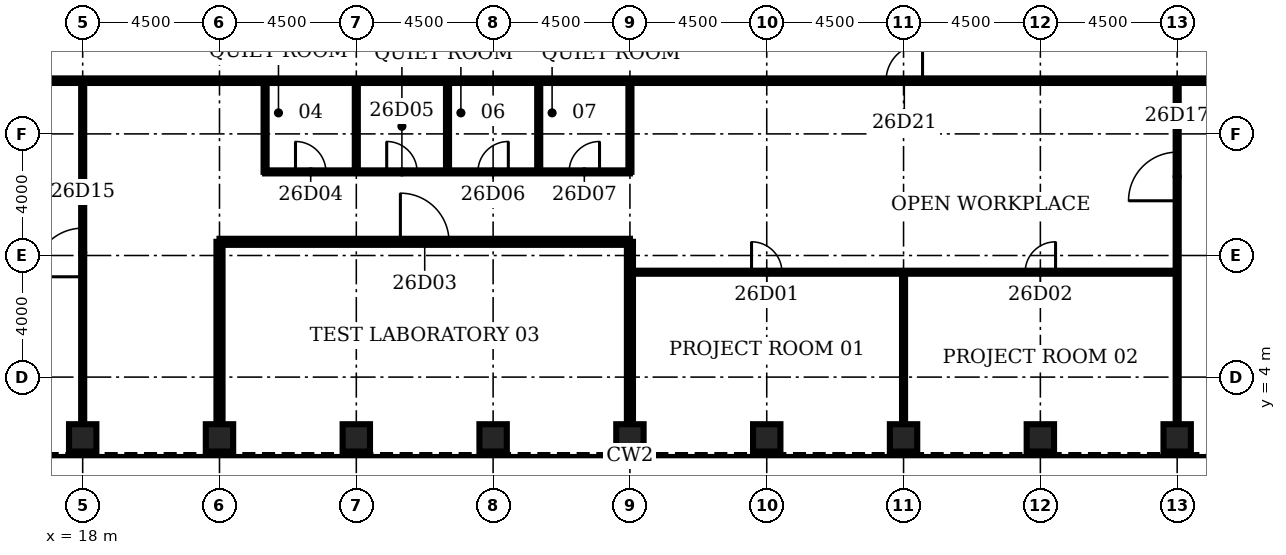
"""IFC4 building model, lengths in metres.
Left out: names, types, materials, properties, quantities, classifications, styles, units other than length and angle.
Written with IfcOpenShell. Run it as: python <this file> out.ifc"""

import sys

from ifc_helpers import new_model, si_unit, direction, frame, frame_2d, origin, origin_2d, place, context, subcontext, project, spatial, rectangle, hollow_rectangle, extrude, element, fill, save


model = new_model("IFC4")
c1 = context("Model", 3, precision=1e-05, world=origin(), true_north=direction((0.0, 1.0)))
c2 = subcontext(c1, "Body", "Model", "MODEL_VIEW")
j1 = project(units=[si_unit("LENGTHUNIT", "METRE"), si_unit("PLANEANGLEUNIT", "RADIAN")], contexts=[c1])
p1 = place(None, origin())
s1 = spatial("IfcSite", under=j1, at=p1, CompositionType="ELEMENT")
p2 = place(p1, origin())
s2 = spatial("IfcBuilding", under=s1, at=p2, CompositionType="ELEMENT")
p3 = place(p2, frame((0.0, 0.0, 121.5)))
s3 = spatial("IfcBuildingStorey", under=s2, at=p3, CompositionType="ELEMENT", Elevation=121.5)
for number, where, z_axis, x_axis in (
    (1, (18.0, 2.0, 0.0), (0.0, 0.0, 1.0), (0.0, 1.0, 0.0)),
    (2, (22.5, 2.0, 0.0), (0.0, 0.0, 1.0), (0.0, 1.0, 0.0)),
    (3, (27.0, 2.0, 0.0), (0.0, 0.0, 1.0), (0.0, 1.0, 0.0)),
    (4, (31.5, 2.0, 0.0), (0.0, 0.0, 1.0), (0.0, 1.0, 0.0)),
    (5, (36.0, 2.0, 0.0), (0.0, 0.0, 1.0), (0.0, 1.0, 0.0)),
    (6, (40.5, 2.0, 0.0), (0.0, 0.0, 1.0), (0.0, 1.0, 0.0)),
    (7, (45.0, 2.0, 0.0), (0.0, 0.0, 1.0), (0.0, 1.0, 0.0)),
    (8, (49.5, 2.0, 0.0), (0.0, 0.0, 1.0), (0.0, 1.0, 0.0)),
    (9, (54.0, 2.0, 0.0), (0.0, 0.0, 1.0), (0.0, 1.0, 0.0)),
):
    element("IfcColumn", number, at=place(p3, frame(where, z_axis=z_axis, x_axis=x_axis)), inside=s3, PredefinedType="COLUMN", context=c2, shape_type="SweptSolid", body=[
        extrude(hollow_rectangle(XDim=0.9, YDim=0.9, WallThickness=0.1, at=origin_2d()), origin(), (0.0, 0.0, 1.0), 4.2),
    ])
p4 = place(p3, frame((36.0, 7.45, 0.0), z_axis=(0.0, 0.0, 1.0), x_axis=(1.0, 0.0, 0.0)))
e10 = element("IfcWall", 10, at=p4, inside=s3, PredefinedType="PARTITIONING", context=c2, shape_type="SweptSolid", body=[
    extrude(rectangle(XDim=18.0, YDim=0.1, at=frame_2d((9.0, 0.0))), origin(), (0.0, 0.0, 1.0), 3.0),
])
p5 = place(p4, frame((4.0, 0.0, 0.0)))
e11 = element("IfcOpeningElement", 11, at=p5, cuts=e10, PredefinedType="OPENING", context=c2, shape_type="SweptSolid", body=[
    extrude(rectangle(XDim=1.0, YDim=2.1, at=frame_2d((0.5, 1.05))), frame((0.0, 0.06, 0.0), z_axis=(0.0, -1.0, 0.0), x_axis=(1.0, 0.0, 0.0)), (0.0, 0.0, 1.0), 0.12),
])
p6 = place(p4, frame((13.0, 0.0, 0.0)))
e12 = element("IfcOpeningElement", 12, at=p6, cuts=e10, PredefinedType="OPENING", context=c2, shape_type="SweptSolid", body=[
    extrude(rectangle(XDim=1.0, YDim=2.1, at=frame_2d((0.5, 1.05))), frame((0.0, 0.06, 0.0), z_axis=(0.0, -1.0, 0.0), x_axis=(1.0, 0.0, 0.0)), (0.0, 0.0, 1.0), 0.12),
])
p7 = place(p3, frame((22.5, 8.45, 0.0), z_axis=(0.0, 0.0, 1.0), x_axis=(1.0, 0.0, 0.0)))
e13 = element("IfcWall", 13, at=p7, inside=s3, PredefinedType="PARTITIONING", context=c2, shape_type="SweptSolid", body=[
    extrude(rectangle(XDim=13.5, YDim=0.2, at=frame_2d((6.75, 0.0))), origin(), (0.0, 0.0, 1.0), 3.0),
])
p8 = place(p7, frame((5.95, 0.0, 0.0)))
e14 = element("IfcOpeningElement", 14, at=p8, cuts=e13, PredefinedType="OPENING", context=c2, shape_type="SweptSolid", body=[
    extrude(rectangle(XDim=1.6, YDim=2.1, at=frame_2d((0.8, 1.05))), frame((0.0, 0.11, 0.0), z_axis=(0.0, -1.0, 0.0), x_axis=(1.0, 0.0, 0.0)), (0.0, 0.0, 1.0), 0.22),
])
p9 = place(p3, frame((24.0, 10.75, 0.0), z_axis=(0.0, 0.0, 1.0), x_axis=(1.0, 0.0, 0.0)))
e15 = element("IfcWall", 15, at=p9, inside=s3, PredefinedType="PARTITIONING", context=c2, shape_type="SweptSolid", body=[
    extrude(rectangle(XDim=12.0, YDim=0.1, at=frame_2d((6.0, 0.0))), origin(), (0.0, 0.0, 1.0), 3.0),
])
p10 = place(p9, frame((1.0, 0.0, 0.0)))
e16 = element("IfcOpeningElement", 16, at=p10, cuts=e15, PredefinedType="OPENING", context=c2, shape_type="SweptSolid", body=[
    extrude(rectangle(XDim=1.0, YDim=2.1, at=frame_2d((0.5, 1.05))), frame((0.0, 0.06, 0.0), z_axis=(0.0, -1.0, 0.0), x_axis=(1.0, 0.0, 0.0)), (0.0, 0.0, 1.0), 0.12),
])
p11 = place(p9, frame((4.0, 0.0, 0.0)))
e17 = element("IfcOpeningElement", 17, at=p11, cuts=e15, PredefinedType="OPENING", context=c2, shape_type="SweptSolid", body=[
    extrude(rectangle(XDim=1.0, YDim=2.1, at=frame_2d((0.5, 1.05))), frame((0.0, 0.06, 0.0), z_axis=(0.0, -1.0, 0.0), x_axis=(1.0, 0.0, 0.0)), (0.0, 0.0, 1.0), 0.12),
])
p12 = place(p9, frame((7.0, 0.0, 0.0)))
e18 = element("IfcOpeningElement", 18, at=p12, cuts=e15, PredefinedType="OPENING", context=c2, shape_type="SweptSolid", body=[
    extrude(rectangle(XDim=1.0, YDim=2.1, at=frame_2d((0.5, 1.05))), frame((0.0, 0.06, 0.0), z_axis=(0.0, -1.0, 0.0), x_axis=(1.0, 0.0, 0.0)), (0.0, 0.0, 1.0), 0.12),
])
p13 = place(p9, frame((10.0, 0.0, 0.0)))
e19 = element("IfcOpeningElement", 19, at=p13, cuts=e15, PredefinedType="OPENING", context=c2, shape_type="SweptSolid", body=[
    extrude(rectangle(XDim=1.0, YDim=2.1, at=frame_2d((0.5, 1.05))), frame((0.0, 0.06, 0.0), z_axis=(0.0, -1.0, 0.0), x_axis=(1.0, 0.0, 0.0)), (0.0, 0.0, 1.0), 0.12),
])
p14 = place(p3, frame((15.15, 13.75, 0.0), z_axis=(0.0, 0.0, 1.0), x_axis=(1.0, 0.0, 0.0)))
e20 = element("IfcWall", 20, at=p14, inside=s3, PredefinedType="PARTITIONING", context=c2, shape_type="SweptSolid", body=[
    extrude(rectangle(XDim=41.7, YDim=0.15, at=frame_2d((20.85, 0.0))), origin(), (0.0, 0.0, 1.0), 3.0),
])
p15 = place(p14, frame((29.275, 0.0, 0.0)))
e21 = element("IfcOpeningElement", 21, at=p15, cuts=e20, PredefinedType="OPENING", context=c2, shape_type="SweptSolid", body=[
    extrude(rectangle(XDim=1.2, YDim=2.1, at=frame_2d((0.6, 1.05))), frame((0.0, 0.085, 0.0), z_axis=(0.0, -1.0, 0.0), x_axis=(1.0, 0.0, 0.0)), (0.0, 0.0, 1.0), 0.17),
])
p16 = place(p3, frame((18.0, 2.45, 0.0), z_axis=(0.0, 0.0, 1.0), x_axis=(0.0, 1.0, 0.0)))
e22 = element("IfcWall", 22, at=p16, inside=s3, PredefinedType="PARTITIONING", context=c2, shape_type="SweptSolid", body=[
    extrude(rectangle(XDim=11.3, YDim=0.1, at=frame_2d((5.65, 0.0))), origin(), (0.0, 0.0, 1.0), 3.0),
])
p17 = place(p16, frame((4.85, 0.0, 0.0)))
e23 = element("IfcOpeningElement", 23, at=p17, cuts=e22, PredefinedType="OPENING", context=c2, shape_type="SweptSolid", body=[
    extrude(rectangle(XDim=1.6, YDim=2.1, at=frame_2d((0.8, 1.05))), frame((0.0, 0.06, 0.0), z_axis=(0.0, -1.0, 0.0), x_axis=(1.0, 0.0, 0.0)), (0.0, 0.0, 1.0), 0.12),
])
p18 = place(p3, frame((22.5, 2.45, 0.0), z_axis=(0.0, 0.0, 1.0), x_axis=(0.0, 1.0, 0.0)))
e24 = element("IfcWall", 24, at=p18, inside=s3, PredefinedType="PARTITIONING", context=c2, shape_type="SweptSolid", body=[
    extrude(rectangle(XDim=6.0, YDim=0.2, at=frame_2d((3.0, 0.0))), origin(), (0.0, 0.0, 1.0), 3.0),
])
for number, where, z_axis, x_axis in (
    (25, (24.0, 10.75, 0.0), (0.0, 0.0, 1.0), (0.0, 1.0, 0.0)),
    (26, (27.0, 10.75, 0.0), (0.0, 0.0, 1.0), (0.0, 1.0, 0.0)),
    (27, (30.0, 10.75, 0.0), (0.0, 0.0, 1.0), (0.0, 1.0, 0.0)),
    (28, (33.0, 10.75, 0.0), (0.0, 0.0, 1.0), (0.0, 1.0, 0.0)),
):
    element("IfcWall", number, at=place(p3, frame(where, z_axis=z_axis, x_axis=x_axis)), inside=s3, PredefinedType="PARTITIONING", context=c2, shape_type="SweptSolid", body=[
        extrude(rectangle(XDim=3.0, YDim=0.1, at=frame_2d((1.5, 0.0))), origin(), (0.0, 0.0, 1.0), 3.0),
    ])
p19 = place(p3, frame((36.0, 2.45, 0.0), z_axis=(0.0, 0.0, 1.0), x_axis=(0.0, 1.0, 0.0)))
e29 = element("IfcWall", 29, at=p19, inside=s3, PredefinedType="PARTITIONING", context=c2, shape_type="SweptSolid", body=[
    extrude(rectangle(XDim=6.0, YDim=0.2, at=frame_2d((3.0, 0.0))), origin(), (0.0, 0.0, 1.0), 3.0),
])
p20 = place(p3, frame((36.0, 10.75, 0.0), z_axis=(0.0, 0.0, 1.0), x_axis=(0.0, 1.0, 0.0)))
e30 = element("IfcWall", 30, at=p20, inside=s3, PredefinedType="PARTITIONING", context=c2, shape_type="SweptSolid", body=[
    extrude(rectangle(XDim=3.0, YDim=0.1, at=frame_2d((1.5, 0.0))), origin(), (0.0, 0.0, 1.0), 3.0),
])
p21 = place(p3, frame((45.0, 2.45, 0.0), z_axis=(0.0, 0.0, 1.0), x_axis=(0.0, 1.0, 0.0)))
e31 = element("IfcWall", 31, at=p21, inside=s3, PredefinedType="PARTITIONING", context=c2, shape_type="SweptSolid", body=[
    extrude(rectangle(XDim=5.0, YDim=0.1, at=frame_2d((2.5, 0.0))), origin(), (0.0, 0.0, 1.0), 3.0),
])
p22 = place(p3, frame((54.0, 2.45, 0.0), z_axis=(0.0, 0.0, 1.0), x_axis=(0.0, 1.0, 0.0)))
e32 = element("IfcWall", 32, at=p22, inside=s3, PredefinedType="PARTITIONING", context=c2, shape_type="SweptSolid", body=[
    extrude(rectangle(XDim=11.3, YDim=0.1, at=frame_2d((5.65, 0.0))), origin(), (0.0, 0.0, 1.0), 3.0),
])
p23 = place(p22, frame((7.35, 0.0, 0.0)))
e33 = element("IfcOpeningElement", 33, at=p23, cuts=e32, PredefinedType="OPENING", context=c2, shape_type="SweptSolid", body=[
    extrude(rectangle(XDim=1.6, YDim=2.1, at=frame_2d((0.8, 1.05))), frame((0.0, 0.06, 0.0), z_axis=(0.0, -1.0, 0.0), x_axis=(1.0, 0.0, 0.0)), (0.0, 0.0, 1.0), 0.12),
])
p24 = place(p5, origin())
e34 = element("IfcDoor", 34, at=p24, inside=s3, OperationType="SINGLE_SWING_LEFT", PredefinedType="DOOR", context=c2, shape_type="SweptSolid", body=[
    extrude(rectangle(XDim=1.0, YDim=2.1, at=frame_2d((0.5, 1.05))), frame((0.0, 0.025, 0.0), z_axis=(0.0, -1.0, 0.0), x_axis=(1.0, 0.0, 0.0)), (0.0, 0.0, 1.0), 0.05),
])
fill(e11, e34)
p25 = place(p6, origin())
e35 = element("IfcDoor", 35, at=p25, inside=s3, OperationType="SINGLE_SWING_RIGHT", PredefinedType="DOOR", context=c2, shape_type="SweptSolid", body=[
    extrude(rectangle(XDim=1.0, YDim=2.1, at=frame_2d((0.5, 1.05))), frame((0.0, 0.025, 0.0), z_axis=(0.0, -1.0, 0.0), x_axis=(1.0, 0.0, 0.0)), (0.0, 0.0, 1.0), 0.05),
])
fill(e12, e35)
p26 = place(p8, origin())
e36 = element("IfcDoor", 36, at=p26, inside=s3, OperationType="SINGLE_SWING_LEFT", PredefinedType="DOOR", context=c2, shape_type="SweptSolid", body=[
    extrude(rectangle(XDim=1.6, YDim=2.1, at=frame_2d((0.8, 1.05))), frame((0.0, 0.025, 0.0), z_axis=(0.0, -1.0, 0.0), x_axis=(1.0, 0.0, 0.0)), (0.0, 0.0, 1.0), 0.05),
])
fill(e14, e36)
p27 = place(p10, origin())
e37 = element("IfcDoor", 37, at=p27, inside=s3, OperationType="SINGLE_SWING_LEFT", PredefinedType="DOOR", context=c2, shape_type="SweptSolid", body=[
    extrude(rectangle(XDim=1.0, YDim=2.1, at=frame_2d((0.5, 1.05))), frame((0.0, 0.025, 0.0), z_axis=(0.0, -1.0, 0.0), x_axis=(1.0, 0.0, 0.0)), (0.0, 0.0, 1.0), 0.05),
])
fill(e16, e37)
p28 = place(p11, origin())
e38 = element("IfcDoor", 38, at=p28, inside=s3, OperationType="SINGLE_SWING_LEFT", PredefinedType="DOOR", context=c2, shape_type="SweptSolid", body=[
    extrude(rectangle(XDim=1.0, YDim=2.1, at=frame_2d((0.5, 1.05))), frame((0.0, 0.025, 0.0), z_axis=(0.0, -1.0, 0.0), x_axis=(1.0, 0.0, 0.0)), (0.0, 0.0, 1.0), 0.05),
])
fill(e17, e38)
p29 = place(p12, origin())
e39 = element("IfcDoor", 39, at=p29, inside=s3, OperationType="SINGLE_SWING_RIGHT", PredefinedType="DOOR", context=c2, shape_type="SweptSolid", body=[
    extrude(rectangle(XDim=1.0, YDim=2.1, at=frame_2d((0.5, 1.05))), frame((0.0, 0.025, 0.0), z_axis=(0.0, -1.0, 0.0), x_axis=(1.0, 0.0, 0.0)), (0.0, 0.0, 1.0), 0.05),
])
fill(e18, e39)
p30 = place(p13, origin())
e40 = element("IfcDoor", 40, at=p30, inside=s3, OperationType="SINGLE_SWING_RIGHT", PredefinedType="DOOR", context=c2, shape_type="SweptSolid", body=[
    extrude(rectangle(XDim=1.0, YDim=2.1, at=frame_2d((0.5, 1.05))), frame((0.0, 0.025, 0.0), z_axis=(0.0, -1.0, 0.0), x_axis=(1.0, 0.0, 0.0)), (0.0, 0.0, 1.0), 0.05),
])
fill(e19, e40)
p31 = place(p17, origin())
e41 = element("IfcDoor", 41, at=p31, inside=s3, OperationType="SINGLE_SWING_LEFT", PredefinedType="DOOR", context=c2, shape_type="SweptSolid", body=[
    extrude(rectangle(XDim=1.6, YDim=2.1, at=frame_2d((0.8, 1.05))), frame((0.0, 0.025, 0.0), z_axis=(0.0, -1.0, 0.0), x_axis=(1.0, 0.0, 0.0)), (0.0, 0.0, 1.0), 0.05),
])
fill(e23, e41)
p32 = place(p23, origin())
e42 = element("IfcDoor", 42, at=p32, inside=s3, OperationType="SINGLE_SWING_LEFT", PredefinedType="DOOR", context=c2, shape_type="SweptSolid", body=[
    extrude(rectangle(XDim=1.6, YDim=2.1, at=frame_2d((0.8, 1.05))), frame((0.0, 0.025, 0.0), z_axis=(0.0, -1.0, 0.0), x_axis=(1.0, 0.0, 0.0)), (0.0, 0.0, 1.0), 0.05),
])
fill(e33, e42)
p33 = place(p15, origin())
e43 = element("IfcDoor", 43, at=p33, inside=s3, OperationType="SINGLE_SWING_RIGHT", PredefinedType="DOOR", context=c2, shape_type="SweptSolid", body=[
    extrude(rectangle(XDim=1.2, YDim=2.1, at=frame_2d((0.6, 1.05))), frame((0.0, 0.025, 0.0), z_axis=(0.0, -1.0, 0.0), x_axis=(1.0, 0.0, 0.0)), (0.0, 0.0, 1.0), 0.05),
])
fill(e21, e43)
save(model, sys.argv[1])
